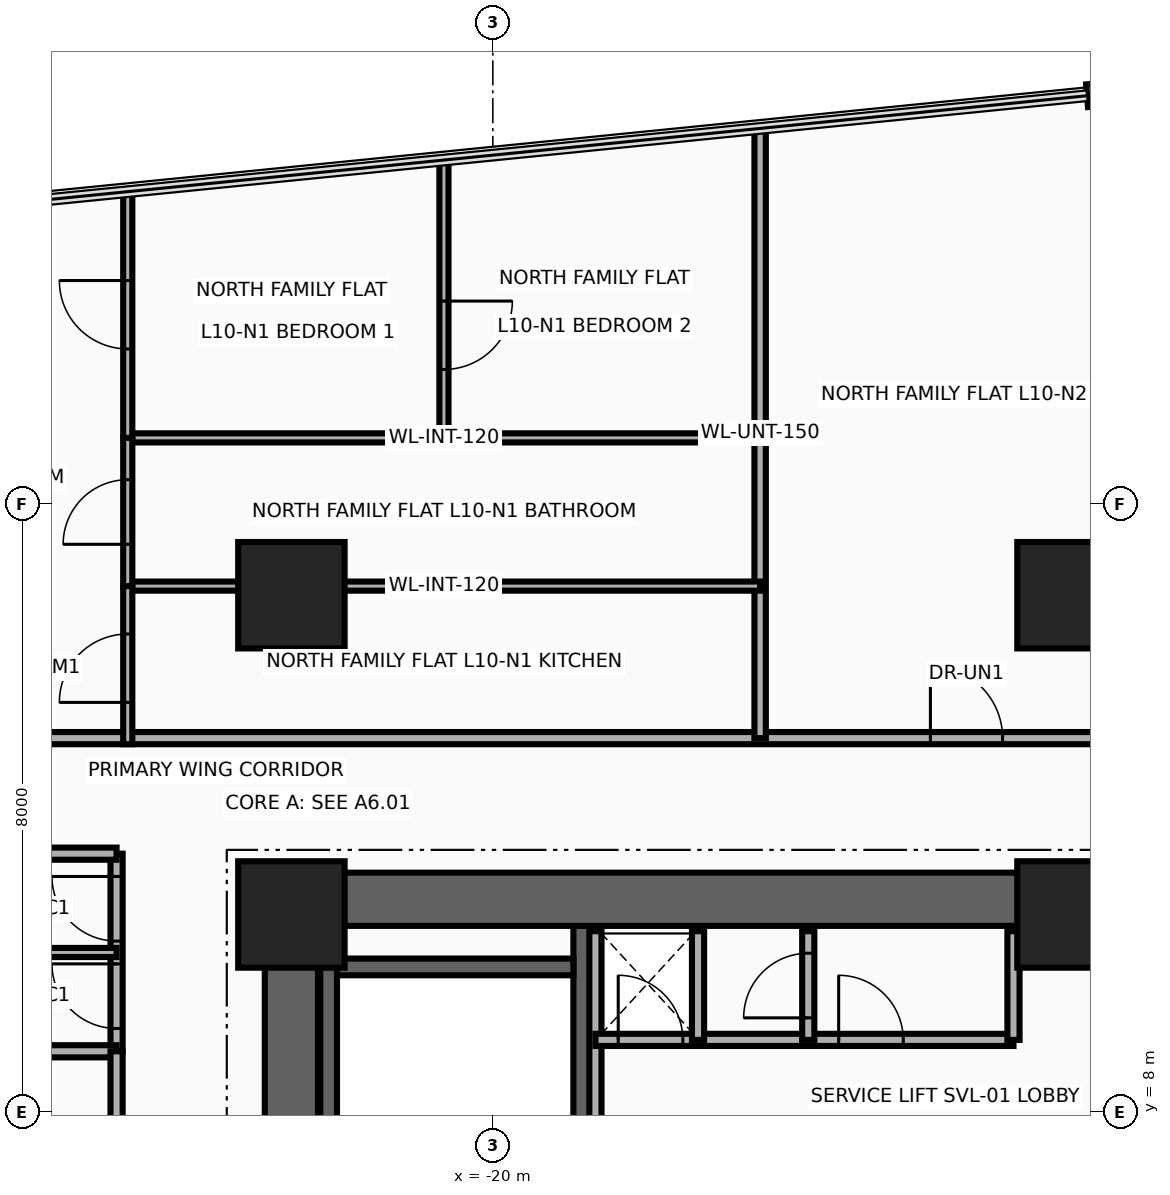
"""IFC4 building model, lengths in metres.
Left out: names, types, materials, properties, quantities, classifications, styles, units other than length and angle.
Written with IfcOpenShell. Run it as: python <this file> out.ifc"""

import sys

from ifc_helpers import new_model, si_unit, direction, frame, frame_2d, origin, origin_2d, place, context, subcontext, project, spatial, rectangle, extrude, source, transform, mapped, element, fill, save


model = new_model("IFC4")
c1 = context("Model", 3, precision=1e-05, world=origin(), true_north=direction((0.0, 1.0)))
c2 = subcontext(c1, "Body", "Model", "MODEL_VIEW")
j1 = project(units=[si_unit("LENGTHUNIT", "METRE"), si_unit("PLANEANGLEUNIT", "RADIAN")], contexts=[c1])
p1 = place(None, origin())
s1 = spatial("IfcSite", under=j1, at=p1, CompositionType="ELEMENT")
p2 = place(p1, origin())
s2 = spatial("IfcBuilding", under=s1, at=p2, CompositionType="ELEMENT")
p3 = place(p2, frame((0.0, 0.0, 44.5)))
s3 = spatial("IfcBuildingStorey", under=s2, at=p3, CompositionType="ELEMENT", Elevation=44.5)
for number, where, z_axis, x_axis in (
    (1, (-22.16, 1.78, 0.0), (0.0, 0.0, 1.0), (0.0, 1.0, 0.0)),
    (2, (-18.83, 1.78, 0.0), (0.0, 0.0, 1.0), (0.0, 1.0, 0.0)),
):
    element("IfcWall", number, at=place(p3, frame(where, z_axis=z_axis, x_axis=x_axis)), inside=s3, PredefinedType="SHEAR", context=c2, shape_type="SweptSolid", body=[
        extrude(rectangle(XDim=8.67, YDim=0.22, at=frame_2d((4.335, 0.0))), origin(), (0.0, 0.0, 1.0), 3.46),
    ])
p4 = place(p3, frame((-22.05, 9.91, 0.0), z_axis=(0.0, 0.0, 1.0), x_axis=(1.0, 0.0, 0.0)))
e3 = element("IfcWall", 3, at=p4, inside=s3, PredefinedType="SHEAR", context=c2, shape_type="SweptSolid", body=[
    extrude(rectangle(XDim=3.11, YDim=0.22, at=frame_2d((1.555, 0.0))), origin(), (0.0, 0.0, 1.0), 3.46),
])
p5 = place(p3, frame((-22.65, -11.15, 0.0), z_axis=(0.0, 0.0, 1.0), x_axis=(0.0, 1.0, 0.0)))
e4 = element("IfcWall", 4, at=p5, inside=s3, PredefinedType="SHEAR", context=c2, shape_type="SweptSolid", body=[
    extrude(rectangle(XDim=22.3, YDim=0.7, at=frame_2d((11.15, 0.0))), origin(), (0.0, 0.0, 1.0), 3.46),
])
p6 = place(p3, frame((-22.65, 10.8, 0.0), z_axis=(0.0, 0.0, 1.0), x_axis=(1.0, 0.0, 0.0)))
e5 = element("IfcWall", 5, at=p6, inside=s3, PredefinedType="SHEAR", context=c2, shape_type="SweptSolid", body=[
    extrude(rectangle(XDim=10.25, YDim=0.7, at=frame_2d((5.125, 0.0))), origin(), (0.0, 0.0, 1.0), 3.46),
])
m1 = source(origin(), c2, "Body", "SweptSolid", [
    extrude(rectangle(XDim=1.4, YDim=1.4, at=origin_2d()), origin(), (0.0, 0.0, 1.0), 3.7),
])
for number, where, z_axis, x_axis in (
    (6, (-22.65, 10.6, 0.0), (0.0, 0.0, 1.0), (1.0, 0.0, 0.0)),
    (7, (-12.4, 10.6, 0.0), (0.0, 0.0, 1.0), (1.0, 0.0, 0.0)),
    (8, (-22.65, 14.8, 0.0), (0.0, 0.0, 1.0), (1.0, 0.0, 0.0)),
    (9, (-12.4, 14.8, 0.0), (0.0, 0.0, 1.0), (1.0, 0.0, 0.0)),
):
    element("IfcColumn", number, at=place(p3, frame(where, z_axis=z_axis, x_axis=x_axis)), inside=s3, PredefinedType="COLUMN", context=c2, shape_type="MappedRepresentation", body=[
        mapped(m1, transform((0.0, 0.0, 0.0), x_axis=(1.0, 0.0, 0.0), y_axis=(0.0, 1.0, 0.0), z_axis=(0.0, 0.0, 1.0), scale=1.0)),
    ])
p7 = place(p3, frame((-12.182, 21.371, 0.0), z_axis=(0.0, 0.0, 1.0), x_axis=(0.996527790842, 0.08326080759, 0.0)))
e10 = element("IfcWall", 10, at=p7, inside=s3, PredefinedType="SOLIDWALL", context=c2, shape_type="SweptSolid", body=[
    extrude(rectangle(XDim=0.094, YDim=0.3, at=frame_2d((0.047, 0.0))), origin(), (0.0, 0.0, 1.0), 3.46),
])
p8 = place(p3, frame((-18.65, 7.45, 0.0), z_axis=(0.0, 0.0, 1.0), x_axis=(0.0, 1.0, 0.0)))
e11 = element("IfcWall", 11, at=p8, inside=s3, PredefinedType="PARTITIONING", context=c2, shape_type="SweptSolid", body=[
    extrude(rectangle(XDim=2.93, YDim=0.16, at=frame_2d((1.465, 0.0))), origin(), (0.0, 0.0, 1.0), 3.46),
])
p9 = place(p3, frame((-18.65, 8.95, 0.0), z_axis=(0.0, 0.0, 1.0), x_axis=(1.0, 0.0, 0.0)))
e12 = element("IfcWall", 12, at=p9, inside=s3, PredefinedType="PARTITIONING", context=c2, shape_type="SweptSolid", body=[
    extrude(rectangle(XDim=5.5, YDim=0.16, at=frame_2d((2.75, 0.0))), origin(), (0.0, 0.0, 1.0), 3.46),
])
p10 = place(p9, frame((0.3, 0.0, 0.0)))
e13 = element("IfcOpeningElement", 13, at=p10, cuts=e12, PredefinedType="OPENING", context=c2, shape_type="SweptSolid", body=[
    extrude(rectangle(XDim=0.85, YDim=2.05, at=frame_2d((0.425, 1.025))), frame((0.0, 0.095, 0.0), z_axis=(0.0, -1.0, 0.0), x_axis=(1.0, 0.0, 0.0)), (0.0, 0.0, 1.0), 0.19),
])
p11 = place(p9, frame((3.2, 0.0, 0.0)))
e14 = element("IfcOpeningElement", 14, at=p11, cuts=e12, PredefinedType="OPENING", context=c2, shape_type="SweptSolid", body=[
    extrude(rectangle(XDim=0.85, YDim=2.05, at=frame_2d((0.425, 1.025))), frame((0.0, 0.095, 0.0), z_axis=(0.0, -1.0, 0.0), x_axis=(1.0, 0.0, 0.0)), (0.0, 0.0, 1.0), 0.19),
])
for number, where, z_axis, x_axis in (
    (15, (-13.15, 8.95, 0.0), (0.0, 0.0, 1.0), (0.0, 1.0, 0.0)),
    (16, (-17.3, 8.95, 0.0), (0.0, 0.0, 1.0), (0.0, 1.0, 0.0)),
):
    element("IfcWall", number, at=place(p3, frame(where, z_axis=z_axis, x_axis=x_axis)), inside=s3, PredefinedType="PARTITIONING", context=c2, shape_type="SweptSolid", body=[
        extrude(rectangle(XDim=1.43, YDim=0.16, at=frame_2d((0.715, 0.0))), origin(), (0.0, 0.0, 1.0), 3.46),
    ])
p12 = place(p3, frame((-15.85, 8.95, 0.0), z_axis=(0.0, 0.0, 1.0), x_axis=(0.0, 1.0, 0.0)))
e17 = element("IfcWall", 17, at=p12, inside=s3, PredefinedType="PARTITIONING", context=c2, shape_type="SweptSolid", body=[
    extrude(rectangle(XDim=1.43, YDim=0.16, at=frame_2d((0.715, 0.0))), origin(), (0.0, 0.0, 1.0), 3.46),
])
p13 = place(p12, frame((0.29, 0.0, 0.0)))
e18 = element("IfcOpeningElement", 18, at=p13, cuts=e17, PredefinedType="OPENING", context=c2, shape_type="SweptSolid", body=[
    extrude(rectangle(XDim=0.85, YDim=2.05, at=frame_2d((0.425, 1.025))), frame((0.0, 0.095, 0.0), z_axis=(0.0, -1.0, 0.0), x_axis=(1.0, 0.0, 0.0)), (0.0, 0.0, 1.0), 0.19),
])
p14 = place(p3, frame((-24.95, 8.8, 0.0), z_axis=(0.0, 0.0, 1.0), x_axis=(0.0, 1.0, 0.0)))
e19 = element("IfcWall", 19, at=p14, inside=s3, PredefinedType="PARTITIONING", context=c2, shape_type="SweptSolid", body=[
    extrude(rectangle(XDim=2.6, YDim=0.16, at=frame_2d((1.3, 0.0))), origin(), (0.0, 0.0, 1.0), 2.583),
])
p15 = place(p14, frame((0.3, 0.0, 0.0)))
e20 = element("IfcOpeningElement", 20, at=p15, cuts=e19, PredefinedType="OPENING", context=c2, shape_type="SweptSolid", body=[
    extrude(rectangle(XDim=0.85, YDim=2.1, at=frame_2d((0.425, 1.05))), frame((0.0, 0.095, 0.0), z_axis=(0.0, -1.0, 0.0), x_axis=(1.0, 0.0, 0.0)), (0.0, 0.0, 1.0), 0.19),
])
p16 = place(p14, frame((1.45, 0.0, 0.0)))
e21 = element("IfcOpeningElement", 21, at=p16, cuts=e19, PredefinedType="OPENING", context=c2, shape_type="SweptSolid", body=[
    extrude(rectangle(XDim=0.85, YDim=2.1, at=frame_2d((0.425, 1.05))), frame((0.0, 0.095, 0.0), z_axis=(0.0, -1.0, 0.0), x_axis=(1.0, 0.0, 0.0)), (0.0, 0.0, 1.0), 0.19),
])
for number, where, z_axis, x_axis in (
    (22, (-28.25, 8.8, 0.0), (0.0, 0.0, 1.0), (1.0, 0.0, 0.0)),
    (23, (-28.25, 11.4, 0.0), (0.0, 0.0, 1.0), (1.0, 0.0, 0.0)),
):
    element("IfcWall", number, at=place(p3, frame(where, z_axis=z_axis, x_axis=x_axis)), inside=s3, PredefinedType="PARTITIONING", context=c2, shape_type="SweptSolid", body=[
        extrude(rectangle(XDim=3.3, YDim=0.16, at=frame_2d((1.65, 0.0))), origin(), (0.0, 0.0, 1.0), 3.46),
    ])
p17 = place(p3, frame((-28.25, 10.1, 0.0), z_axis=(0.0, 0.0, 1.0), x_axis=(1.0, 0.0, 0.0)))
e24 = element("IfcWall", 24, at=p17, inside=s3, PredefinedType="PARTITIONING", context=c2, shape_type="SweptSolid", body=[
    extrude(rectangle(XDim=3.3, YDim=0.12, at=frame_2d((1.65, 0.0))), origin(), (0.0, 0.0, 1.0), 3.46),
])
p18 = place(p3, frame((-24.95, -11.42, 0.0), z_axis=(0.0, 0.0, 1.0), x_axis=(0.0, 1.0, 0.0)))
e25 = element("IfcWall", 25, at=p18, inside=s3, PredefinedType="PARTITIONING", context=c2, shape_type="SweptSolid", body=[
    extrude(rectangle(XDim=20.22, YDim=0.16, at=frame_2d((10.11, 0.0))), origin(), (0.0, 0.0, 1.0), 2.583),
])
p19 = place(p18, frame((1.85, 0.0, 0.0)))
e26 = element("IfcOpeningElement", 26, at=p19, cuts=e25, PredefinedType="OPENING", context=c2, shape_type="SweptSolid", body=[
    extrude(rectangle(XDim=0.95, YDim=2.15, at=frame_2d((0.475, 1.075))), frame((0.0, 0.095, 0.0), z_axis=(0.0, -1.0, 0.0), x_axis=(1.0, 0.0, 0.0)), (0.0, 0.0, 1.0), 0.19),
])
p20 = place(p18, frame((11.96, 0.0, 0.0)))
e27 = element("IfcOpeningElement", 27, at=p20, cuts=e25, PredefinedType="OPENING", context=c2, shape_type="SweptSolid", body=[
    extrude(rectangle(XDim=0.95, YDim=2.15, at=frame_2d((0.475, 1.075))), frame((0.0, 0.095, 0.0), z_axis=(0.0, -1.0, 0.0), x_axis=(1.0, 0.0, 0.0)), (0.0, 0.0, 1.0), 0.19),
])
p21 = place(p3, frame((-31.89, 12.92, 0.0), z_axis=(0.0, 0.0, 1.0), x_axis=(1.0, 0.0, 0.0)))
e28 = element("IfcWall", 28, at=p21, inside=s3, PredefinedType="PARTITIONING", context=c2, shape_type="SweptSolid", body=[
    extrude(rectangle(XDim=45.44, YDim=0.16, at=frame_2d((22.72, 0.0))), origin(), (0.0, 0.0, 1.0), 2.583),
])
p22 = place(p21, frame((3.069, 0.0, 0.0)))
e29 = element("IfcOpeningElement", 29, at=p22, cuts=e28, PredefinedType="OPENING", context=c2, shape_type="SweptSolid", body=[
    extrude(rectangle(XDim=0.95, YDim=2.15, at=frame_2d((0.475, 1.075))), frame((0.0, 0.095, 0.0), z_axis=(0.0, -1.0, 0.0), x_axis=(1.0, 0.0, 0.0)), (0.0, 0.0, 1.0), 0.19),
])
p23 = place(p21, frame((17.647, 0.0, 0.0)))
e30 = element("IfcOpeningElement", 30, at=p23, cuts=e28, PredefinedType="OPENING", context=c2, shape_type="SweptSolid", body=[
    extrude(rectangle(XDim=0.95, YDim=2.15, at=frame_2d((0.475, 1.075))), frame((0.0, 0.095, 0.0), z_axis=(0.0, -1.0, 0.0), x_axis=(1.0, 0.0, 0.0)), (0.0, 0.0, 1.0), 0.19),
])
p24 = place(p21, frame((34.227, 0.0, 0.0)))
e31 = element("IfcOpeningElement", 31, at=p24, cuts=e28, PredefinedType="OPENING", context=c2, shape_type="SweptSolid", body=[
    extrude(rectangle(XDim=0.95, YDim=2.15, at=frame_2d((0.475, 1.075))), frame((0.0, 0.095, 0.0), z_axis=(0.0, -1.0, 0.0), x_axis=(1.0, 0.0, 0.0)), (0.0, 0.0, 1.0), 0.19),
])
p25 = place(p3, frame((-16.483, 12.92, 0.0), z_axis=(0.0, 0.0, 1.0), x_axis=(0.0, 1.0, 0.0)))
e32 = element("IfcWall", 32, at=p25, inside=s3, PredefinedType="PARTITIONING", context=c2, shape_type="SweptSolid", body=[
    extrude(rectangle(XDim=8.021, YDim=0.15, at=frame_2d((4.011, 0.0))), origin(), (0.0, 0.0, 1.0), 2.583),
])
p26 = place(p3, frame((-24.803, 14.92, 0.0), z_axis=(0.0, 0.0, 1.0), x_axis=(1.0, 0.0, 0.0)))
e33 = element("IfcWall", 33, at=p26, inside=s3, PredefinedType="PARTITIONING", context=c2, shape_type="SweptSolid", body=[
    extrude(rectangle(XDim=8.32, YDim=0.12, at=frame_2d((4.16, 0.0))), origin(), (0.0, 0.0, 1.0), 2.583),
])
p27 = place(p3, frame((-24.803, 16.87, 0.0), z_axis=(0.0, 0.0, 1.0), x_axis=(1.0, 0.0, 0.0)))
e34 = element("IfcWall", 34, at=p27, inside=s3, PredefinedType="PARTITIONING", context=c2, shape_type="SweptSolid", body=[
    extrude(rectangle(XDim=8.32, YDim=0.12, at=frame_2d((4.16, 0.0))), origin(), (0.0, 0.0, 1.0), 3.46),
])
p28 = place(p3, frame((-24.803, 14.92, 0.0), z_axis=(0.0, 0.0, 1.0), x_axis=(0.0, 1.0, 0.0)))
e35 = element("IfcWall", 35, at=p28, inside=s3, PredefinedType="PARTITIONING", context=c2, shape_type="SweptSolid", body=[
    extrude(rectangle(XDim=1.95, YDim=0.12, at=frame_2d((0.975, 0.0))), origin(), (0.0, 0.0, 1.0), 2.583),
])
p29 = place(p28, frame((0.55, 0.0, 0.0)))
e36 = element("IfcOpeningElement", 36, at=p29, cuts=e35, PredefinedType="OPENING", context=c2, shape_type="SweptSolid", body=[
    extrude(rectangle(XDim=0.85, YDim=2.1, at=frame_2d((0.425, 1.05))), frame((0.0, 0.075, 0.0), z_axis=(0.0, -1.0, 0.0), x_axis=(1.0, 0.0, 0.0)), (0.0, 0.0, 1.0), 0.15),
])
p30 = place(p3, frame((-24.803, 12.84, 0.0), z_axis=(0.0, 0.0, 1.0), x_axis=(0.0, 1.0, 0.0)))
e37 = element("IfcWall", 37, at=p30, inside=s3, PredefinedType="PARTITIONING", context=c2, shape_type="SweptSolid", body=[
    extrude(rectangle(XDim=2.08, YDim=0.12, at=frame_2d((1.04, 0.0))), origin(), (0.0, 0.0, 1.0), 2.583),
])
p31 = place(p30, frame((0.55, 0.0, 0.0)))
e38 = element("IfcOpeningElement", 38, at=p31, cuts=e37, PredefinedType="OPENING", context=c2, shape_type="SweptSolid", body=[
    extrude(rectangle(XDim=0.9, YDim=2.1, at=frame_2d((0.45, 1.05))), frame((0.0, 0.075, 0.0), z_axis=(0.0, -1.0, 0.0), x_axis=(1.0, 0.0, 0.0)), (0.0, 0.0, 1.0), 0.15),
])
p32 = place(p3, frame((-24.803, 16.87, 0.0), z_axis=(0.0, 0.0, 1.0), x_axis=(0.0, 1.0, 0.0)))
e39 = element("IfcWall", 39, at=p32, inside=s3, PredefinedType="PARTITIONING", context=c2, shape_type="SweptSolid", body=[
    extrude(rectangle(XDim=3.239, YDim=0.12, at=frame_2d((1.62, 0.0))), origin(), (0.0, 0.0, 1.0), 3.46),
])
p33 = place(p32, frame((1.17, 0.0, 0.0)))
e40 = element("IfcOpeningElement", 40, at=p33, cuts=e39, PredefinedType="OPENING", context=c2, shape_type="SweptSolid", body=[
    extrude(rectangle(XDim=0.9, YDim=2.1, at=frame_2d((0.45, 1.05))), frame((0.0, 0.075, 0.0), z_axis=(0.0, -1.0, 0.0), x_axis=(1.0, 0.0, 0.0)), (0.0, 0.0, 1.0), 0.15),
])
p34 = place(p3, frame((-20.643, 16.87, 0.0), z_axis=(0.0, 0.0, 1.0), x_axis=(0.0, 1.0, 0.0)))
e41 = element("IfcWall", 41, at=p34, inside=s3, PredefinedType="PARTITIONING", context=c2, shape_type="SweptSolid", body=[
    extrude(rectangle(XDim=3.655, YDim=0.12, at=frame_2d((1.828, 0.0))), origin(), (0.0, 0.0, 1.0), 3.46),
])
p35 = place(p34, frame((0.9, 0.0, 0.0)))
e42 = element("IfcOpeningElement", 42, at=p35, cuts=e41, PredefinedType="OPENING", context=c2, shape_type="SweptSolid", body=[
    extrude(rectangle(XDim=0.9, YDim=2.1, at=frame_2d((0.45, 1.05))), frame((0.0, 0.075, 0.0), z_axis=(0.0, -1.0, 0.0), x_axis=(1.0, 0.0, 0.0)), (0.0, 0.0, 1.0), 0.15),
])
p36 = place(p10, origin())
e43 = element("IfcDoor", 43, at=p36, inside=s3, OperationType="SINGLE_SWING_LEFT", PredefinedType="DOOR", context=c2, shape_type="SweptSolid", body=[
    extrude(rectangle(XDim=0.85, YDim=2.05, at=frame_2d((0.425, 1.025))), frame((0.0, 0.025, 0.0), z_axis=(0.0, -1.0, 0.0), x_axis=(1.0, 0.0, 0.0)), (0.0, 0.0, 1.0), 0.05),
])
fill(e13, e43)
p37 = place(p11, origin())
e44 = element("IfcDoor", 44, at=p37, inside=s3, OperationType="SINGLE_SWING_RIGHT", PredefinedType="DOOR", context=c2, shape_type="SweptSolid", body=[
    extrude(rectangle(XDim=0.85, YDim=2.05, at=frame_2d((0.425, 1.025))), frame((0.0, 0.025, 0.0), z_axis=(0.0, -1.0, 0.0), x_axis=(1.0, 0.0, 0.0)), (0.0, 0.0, 1.0), 0.05),
])
fill(e14, e44)
p38 = place(p13, origin())
e45 = element("IfcDoor", 45, at=p38, inside=s3, OperationType="SINGLE_SWING_LEFT", PredefinedType="DOOR", context=c2, shape_type="SweptSolid", body=[
    extrude(rectangle(XDim=0.85, YDim=2.05, at=frame_2d((0.425, 1.025))), frame((0.0, 0.025, 0.0), z_axis=(0.0, -1.0, 0.0), x_axis=(1.0, 0.0, 0.0)), (0.0, 0.0, 1.0), 0.05),
])
fill(e18, e45)
p39 = place(p15, origin())
e46 = element("IfcDoor", 46, at=p39, inside=s3, OperationType="SINGLE_SWING_RIGHT", PredefinedType="DOOR", context=c2, shape_type="SweptSolid", body=[
    extrude(rectangle(XDim=0.85, YDim=2.1, at=frame_2d((0.425, 1.05))), frame((0.0, 0.025, 0.0), z_axis=(0.0, -1.0, 0.0), x_axis=(1.0, 0.0, 0.0)), (0.0, 0.0, 1.0), 0.05),
])
fill(e20, e46)
p40 = place(p16, origin())
e47 = element("IfcDoor", 47, at=p40, inside=s3, OperationType="SINGLE_SWING_LEFT", PredefinedType="DOOR", context=c2, shape_type="SweptSolid", body=[
    extrude(rectangle(XDim=0.85, YDim=2.1, at=frame_2d((0.425, 1.05))), frame((0.0, 0.025, 0.0), z_axis=(0.0, -1.0, 0.0), x_axis=(1.0, 0.0, 0.0)), (0.0, 0.0, 1.0), 0.05),
])
fill(e21, e47)
p41 = place(p29, origin())
e48 = element("IfcDoor", 48, at=p41, inside=s3, OperationType="SINGLE_SWING_RIGHT", PredefinedType="DOOR", context=c2, shape_type="SweptSolid", body=[
    extrude(rectangle(XDim=0.85, YDim=2.1, at=frame_2d((0.425, 1.05))), frame((0.0, 0.025, 0.0), z_axis=(0.0, -1.0, 0.0), x_axis=(1.0, 0.0, 0.0)), (0.0, 0.0, 1.0), 0.05),
])
fill(e36, e48)
p42 = place(p31, origin())
e49 = element("IfcDoor", 49, at=p42, inside=s3, OperationType="SINGLE_SWING_LEFT", PredefinedType="DOOR", context=c2, shape_type="SweptSolid", body=[
    extrude(rectangle(XDim=0.9, YDim=2.1, at=frame_2d((0.45, 1.05))), frame((0.0, 0.025, 0.0), z_axis=(0.0, -1.0, 0.0), x_axis=(1.0, 0.0, 0.0)), (0.0, 0.0, 1.0), 0.05),
])
fill(e38, e49)
p43 = place(p33, origin())
e50 = element("IfcDoor", 50, at=p43, inside=s3, OperationType="SINGLE_SWING_RIGHT", PredefinedType="DOOR", context=c2, shape_type="SweptSolid", body=[
    extrude(rectangle(XDim=0.9, YDim=2.1, at=frame_2d((0.45, 1.05))), frame((0.0, 0.025, 0.0), z_axis=(0.0, -1.0, 0.0), x_axis=(1.0, 0.0, 0.0)), (0.0, 0.0, 1.0), 0.05),
])
fill(e40, e50)
p44 = place(p35, frame((0.9, 0.0, 0.0), z_axis=(0.0, 0.0, 1.0), x_axis=(-1.0, 0.0, 0.0)))
e51 = element("IfcDoor", 51, at=p44, inside=s3, OperationType="SINGLE_SWING_LEFT", PredefinedType="DOOR", context=c2, shape_type="SweptSolid", body=[
    extrude(rectangle(XDim=0.9, YDim=2.1, at=frame_2d((0.45, 1.05))), frame((0.0, 0.025, 0.0), z_axis=(0.0, -1.0, 0.0), x_axis=(1.0, 0.0, 0.0)), (0.0, 0.0, 1.0), 0.05),
])
fill(e42, e51)
p45 = place(p23, origin())
e52 = element("IfcDoor", 52, at=p45, inside=s3, OperationType="SINGLE_SWING_RIGHT", PredefinedType="DOOR", context=c2, shape_type="SweptSolid", body=[
    extrude(rectangle(XDim=0.95, YDim=2.15, at=frame_2d((0.475, 1.075))), frame((0.0, 0.025, 0.0), z_axis=(0.0, -1.0, 0.0), x_axis=(1.0, 0.0, 0.0)), (0.0, 0.0, 1.0), 0.05),
])
fill(e30, e52)
save(model, sys.argv[1])
